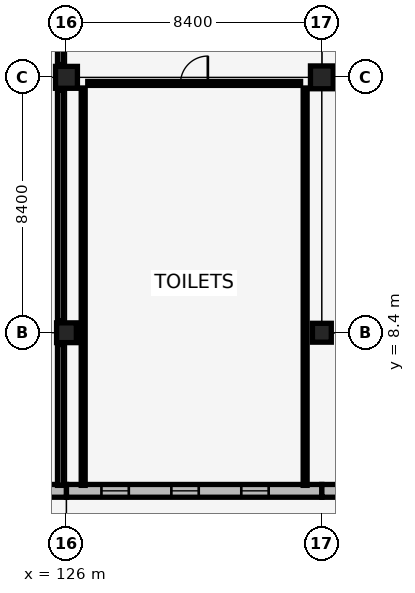
"""IFC4 building model, lengths in metres.
Left out: names, types, materials, properties, quantities, classifications, styles, units other than length and angle.
Written with IfcOpenShell. Run it as: python <this file> out.ifc"""

import sys

from ifc_helpers import new_model, si_unit, direction, frame, frame_2d, origin, origin_2d, place, context, subcontext, project, spatial, rectangle, extrude, element, fill, save


model = new_model("IFC4")
c1 = context("Model", 3, precision=1e-05, world=origin(), true_north=direction((0.0, 1.0)))
c2 = subcontext(c1, "Body", "Model", "MODEL_VIEW")
j1 = project(units=[si_unit("LENGTHUNIT", "METRE"), si_unit("PLANEANGLEUNIT", "RADIAN")], contexts=[c1])
p1 = place(None, origin())
s1 = spatial("IfcSite", under=j1, at=p1, CompositionType="ELEMENT")
p2 = place(p1, origin())
s2 = spatial("IfcBuilding", under=s1, at=p2, CompositionType="ELEMENT")
p3 = place(p2, origin())
s3 = spatial("IfcBuildingStorey", under=s2, at=p3, CompositionType="ELEMENT", Elevation=0.0)
p4 = place(p3, frame((126.0, 8.4, 0.0), z_axis=(0.0, 0.0, 1.0), x_axis=(1.0, 0.0, 0.0)))
e1 = element("IfcColumn", 1, at=p4, inside=s3, PredefinedType="COLUMN", context=c2, shape_type="SweptSolid", body=[
    extrude(rectangle(XDim=0.65, YDim=0.65, at=origin_2d()), origin(), (0.0, 0.0, 1.0), 5.14),
])
p5 = place(p3, frame((126.0, 16.8, 0.0), z_axis=(0.0, 0.0, 1.0), x_axis=(1.0, 0.0, 0.0)))
e2 = element("IfcColumn", 2, at=p5, inside=s3, PredefinedType="COLUMN", context=c2, shape_type="SweptSolid", body=[
    extrude(rectangle(XDim=0.72, YDim=0.72, at=origin_2d()), origin(), (0.0, 0.0, 1.0), 5.14),
])
p6 = place(p3, frame((134.4, 8.4, 0.0), z_axis=(0.0, 0.0, 1.0), x_axis=(1.0, 0.0, 0.0)))
e3 = element("IfcColumn", 3, at=p6, inside=s3, PredefinedType="COLUMN", context=c2, shape_type="SweptSolid", body=[
    extrude(rectangle(XDim=0.62, YDim=0.62, at=origin_2d()), origin(), (0.0, 0.0, 1.0), 5.14),
])
p7 = place(p3, frame((134.4, 16.8, 0.0), z_axis=(0.0, 0.0, 1.0), x_axis=(1.0, 0.0, 0.0)))
e4 = element("IfcColumn", 4, at=p7, inside=s3, PredefinedType="COLUMN", context=c2, shape_type="SweptSolid", body=[
    extrude(rectangle(XDim=0.75, YDim=0.75, at=origin_2d()), origin(), (0.0, 0.0, 1.0), 5.14),
])
p8 = place(p3, frame((117.6, 3.2, 0.0), z_axis=(0.0, 0.0, 1.0), x_axis=(1.0, 0.0, 0.0)))
e5 = element("IfcWall", 5, at=p8, inside=s3, PredefinedType="SOLIDWALL", context=c2, shape_type="SweptSolid", body=[
    extrude(rectangle(XDim=8.4, YDim=0.42, at=frame_2d((4.2, 0.0))), origin(), (0.0, 0.0, 1.0), 4.49),
])
p9 = place(p8, frame((3.1, 0.0, 0.0)))
e6 = element("IfcOpeningElement", 6, at=p9, cuts=e5, PredefinedType="OPENING", context=c2, shape_type="SweptSolid", body=[
    extrude(rectangle(XDim=2.2, YDim=2.4, at=frame_2d((1.1, 1.2))), frame((0.0, 0.22, 0.0), z_axis=(0.0, -1.0, 0.0), x_axis=(1.0, 0.0, 0.0)), (0.0, 0.0, 1.0), 0.44),
])
p10 = place(p3, frame((126.0, 3.2, 0.0), z_axis=(0.0, 0.0, 1.0), x_axis=(1.0, 0.0, 0.0)))
e7 = element("IfcWall", 7, at=p10, inside=s3, PredefinedType="SOLIDWALL", context=c2, shape_type="SweptSolid", body=[
    extrude(rectangle(XDim=8.4, YDim=0.42, at=frame_2d((4.2, 0.0))), origin(), (0.0, 0.0, 1.0), 4.49),
])
p11 = place(p10, frame((1.15, 0.0, 0.85)))
e8 = element("IfcOpeningElement", 8, at=p11, cuts=e7, PredefinedType="OPENING", context=c2, shape_type="SweptSolid", body=[
    extrude(rectangle(XDim=0.9, YDim=3.0, at=frame_2d((0.45, 1.5))), frame((0.0, 0.22, 0.0), z_axis=(0.0, -1.0, 0.0), x_axis=(1.0, 0.0, 0.0)), (0.0, 0.0, 1.0), 0.44),
])
p12 = place(p10, frame((3.45, 0.0, 0.85)))
e9 = element("IfcOpeningElement", 9, at=p12, cuts=e7, PredefinedType="OPENING", context=c2, shape_type="SweptSolid", body=[
    extrude(rectangle(XDim=0.9, YDim=3.0, at=frame_2d((0.45, 1.5))), frame((0.0, 0.22, 0.0), z_axis=(0.0, -1.0, 0.0), x_axis=(1.0, 0.0, 0.0)), (0.0, 0.0, 1.0), 0.44),
])
p13 = place(p10, frame((5.75, 0.0, 0.85)))
e10 = element("IfcOpeningElement", 10, at=p13, cuts=e7, PredefinedType="OPENING", context=c2, shape_type="SweptSolid", body=[
    extrude(rectangle(XDim=0.9, YDim=3.0, at=frame_2d((0.45, 1.5))), frame((0.0, 0.22, 0.0), z_axis=(0.0, -1.0, 0.0), x_axis=(1.0, 0.0, 0.0)), (0.0, 0.0, 1.0), 0.44),
])
p14 = place(p3, frame((134.4, 3.2, 0.0), z_axis=(0.0, 0.0, 1.0), x_axis=(1.0, 0.0, 0.0)))
e11 = element("IfcWall", 11, at=p14, inside=s3, PredefinedType="SOLIDWALL", context=c2, shape_type="SweptSolid", body=[
    extrude(rectangle(XDim=8.4, YDim=0.42, at=frame_2d((4.2, 0.0))), origin(), (0.0, 0.0, 1.0), 4.49),
])
p15 = place(p14, frame((1.15, 0.0, 0.85)))
e12 = element("IfcOpeningElement", 12, at=p15, cuts=e11, PredefinedType="OPENING", context=c2, shape_type="SweptSolid", body=[
    extrude(rectangle(XDim=0.9, YDim=3.0, at=frame_2d((0.45, 1.5))), frame((0.0, 0.22, 0.0), z_axis=(0.0, -1.0, 0.0), x_axis=(1.0, 0.0, 0.0)), (0.0, 0.0, 1.0), 0.44),
])
p16 = place(p14, frame((5.75, 0.0, 0.85)))
e13 = element("IfcOpeningElement", 13, at=p16, cuts=e11, PredefinedType="OPENING", context=c2, shape_type="SweptSolid", body=[
    extrude(rectangle(XDim=0.9, YDim=3.0, at=frame_2d((0.45, 1.5))), frame((0.0, 0.22, 0.0), z_axis=(0.0, -1.0, 0.0), x_axis=(1.0, 0.0, 0.0)), (0.0, 0.0, 1.0), 0.44),
])
p17 = place(p3, frame((125.8, 3.38, 0.0), z_axis=(0.0, 0.0, 1.0), x_axis=(0.0, 1.0, 0.0)))
e14 = element("IfcWall", 14, at=p17, inside=s3, PredefinedType="PARTITIONING", context=c2, shape_type="SweptSolid", body=[
    extrude(rectangle(XDim=4.635, YDim=0.19, at=frame_2d((2.317, 0.0))), origin(), (0.0, 0.0, 1.0), 4.59),
])
p18 = place(p3, frame((125.8, 8.785, 0.0), z_axis=(0.0, 0.0, 1.0), x_axis=(0.0, 1.0, 0.0)))
e15 = element("IfcWall", 15, at=p18, inside=s3, PredefinedType="PARTITIONING", context=c2, shape_type="SweptSolid", body=[
    extrude(rectangle(XDim=7.595, YDim=0.19, at=frame_2d((3.797, 0.0))), origin(), (0.0, 0.0, 1.0), 4.58),
])
p19 = place(p3, frame((125.8, 17.22, 0.0), z_axis=(0.0, 0.0, 1.0), x_axis=(0.0, 1.0, 0.0)))
e16 = element("IfcWall", 16, at=p19, inside=s3, PredefinedType="PARTITIONING", context=c2, shape_type="SweptSolid", body=[
    extrude(rectangle(XDim=4.23, YDim=0.19, at=frame_2d((2.115, 0.0))), origin(), (0.0, 0.0, 1.0), 4.59),
])
p20 = place(p3, frame((126.7, 16.6, 0.0), z_axis=(0.0, 0.0, 1.0), x_axis=(1.0, 0.0, 0.0)))
e17 = element("IfcWall", 17, at=p20, inside=s3, PredefinedType="PARTITIONING", context=c2, shape_type="SweptSolid", body=[
    extrude(rectangle(XDim=7.0, YDim=0.13, at=frame_2d((3.5, 0.0))), origin(), (0.0, 0.0, 1.0), 4.36),
])
p21 = place(p20, frame((3.05, 0.0, 0.0)))
e18 = element("IfcOpeningElement", 18, at=p21, cuts=e17, PredefinedType="OPENING", context=c2, shape_type="SweptSolid", body=[
    extrude(rectangle(XDim=0.9, YDim=2.1, at=frame_2d((0.45, 1.05))), frame((0.0, 0.075, 0.0), z_axis=(0.0, -1.0, 0.0), x_axis=(1.0, 0.0, 0.0)), (0.0, 0.0, 1.0), 0.15),
])
for number, where, z_axis, x_axis in (
    (19, (126.55, 3.38, 0.0), (0.0, 0.0, 1.0), (0.0, 1.0, 0.0)),
    (20, (133.85, 3.38, 0.0), (0.0, 0.0, 1.0), (0.0, 1.0, 0.0)),
):
    element("IfcWall", number, at=place(p3, frame(where, z_axis=z_axis, x_axis=x_axis)), inside=s3, PredefinedType="PARTITIONING", context=c2, shape_type="SweptSolid", body=[
        extrude(rectangle(XDim=13.07, YDim=0.13, at=frame_2d((6.535, 0.0))), origin(), (0.0, 0.0, 1.0), 4.46),
    ])
p22 = place(p11, origin())
e21 = element("IfcWindow", 21, at=p22, inside=s3, PartitioningType="DOUBLE_PANEL_VERTICAL", PredefinedType="WINDOW", context=c2, shape_type="SweptSolid", body=[
    extrude(rectangle(XDim=0.9, YDim=3.0, at=frame_2d((0.45, 1.5))), frame((0.0, 0.03, 0.0), z_axis=(0.0, -1.0, 0.0), x_axis=(1.0, 0.0, 0.0)), (0.0, 0.0, 1.0), 0.06),
])
fill(e8, e21)
p23 = place(p12, origin())
e22 = element("IfcWindow", 22, at=p23, inside=s3, PartitioningType="DOUBLE_PANEL_VERTICAL", PredefinedType="WINDOW", context=c2, shape_type="SweptSolid", body=[
    extrude(rectangle(XDim=0.9, YDim=3.0, at=frame_2d((0.45, 1.5))), frame((0.0, 0.03, 0.0), z_axis=(0.0, -1.0, 0.0), x_axis=(1.0, 0.0, 0.0)), (0.0, 0.0, 1.0), 0.06),
])
fill(e9, e22)
p24 = place(p13, origin())
e23 = element("IfcWindow", 23, at=p24, inside=s3, PartitioningType="DOUBLE_PANEL_VERTICAL", PredefinedType="WINDOW", context=c2, shape_type="SweptSolid", body=[
    extrude(rectangle(XDim=0.9, YDim=3.0, at=frame_2d((0.45, 1.5))), frame((0.0, 0.03, 0.0), z_axis=(0.0, -1.0, 0.0), x_axis=(1.0, 0.0, 0.0)), (0.0, 0.0, 1.0), 0.06),
])
fill(e10, e23)
p25 = place(p21, origin())
e24 = element("IfcDoor", 24, at=p25, inside=s3, OperationType="SINGLE_SWING_RIGHT", PredefinedType="DOOR", context=c2, shape_type="SweptSolid", body=[
    extrude(rectangle(XDim=0.9, YDim=2.1, at=frame_2d((0.45, 1.05))), frame((0.0, 0.025, 0.0), z_axis=(0.0, -1.0, 0.0), x_axis=(1.0, 0.0, 0.0)), (0.0, 0.0, 1.0), 0.05),
])
fill(e18, e24)
save(model, sys.argv[1])
